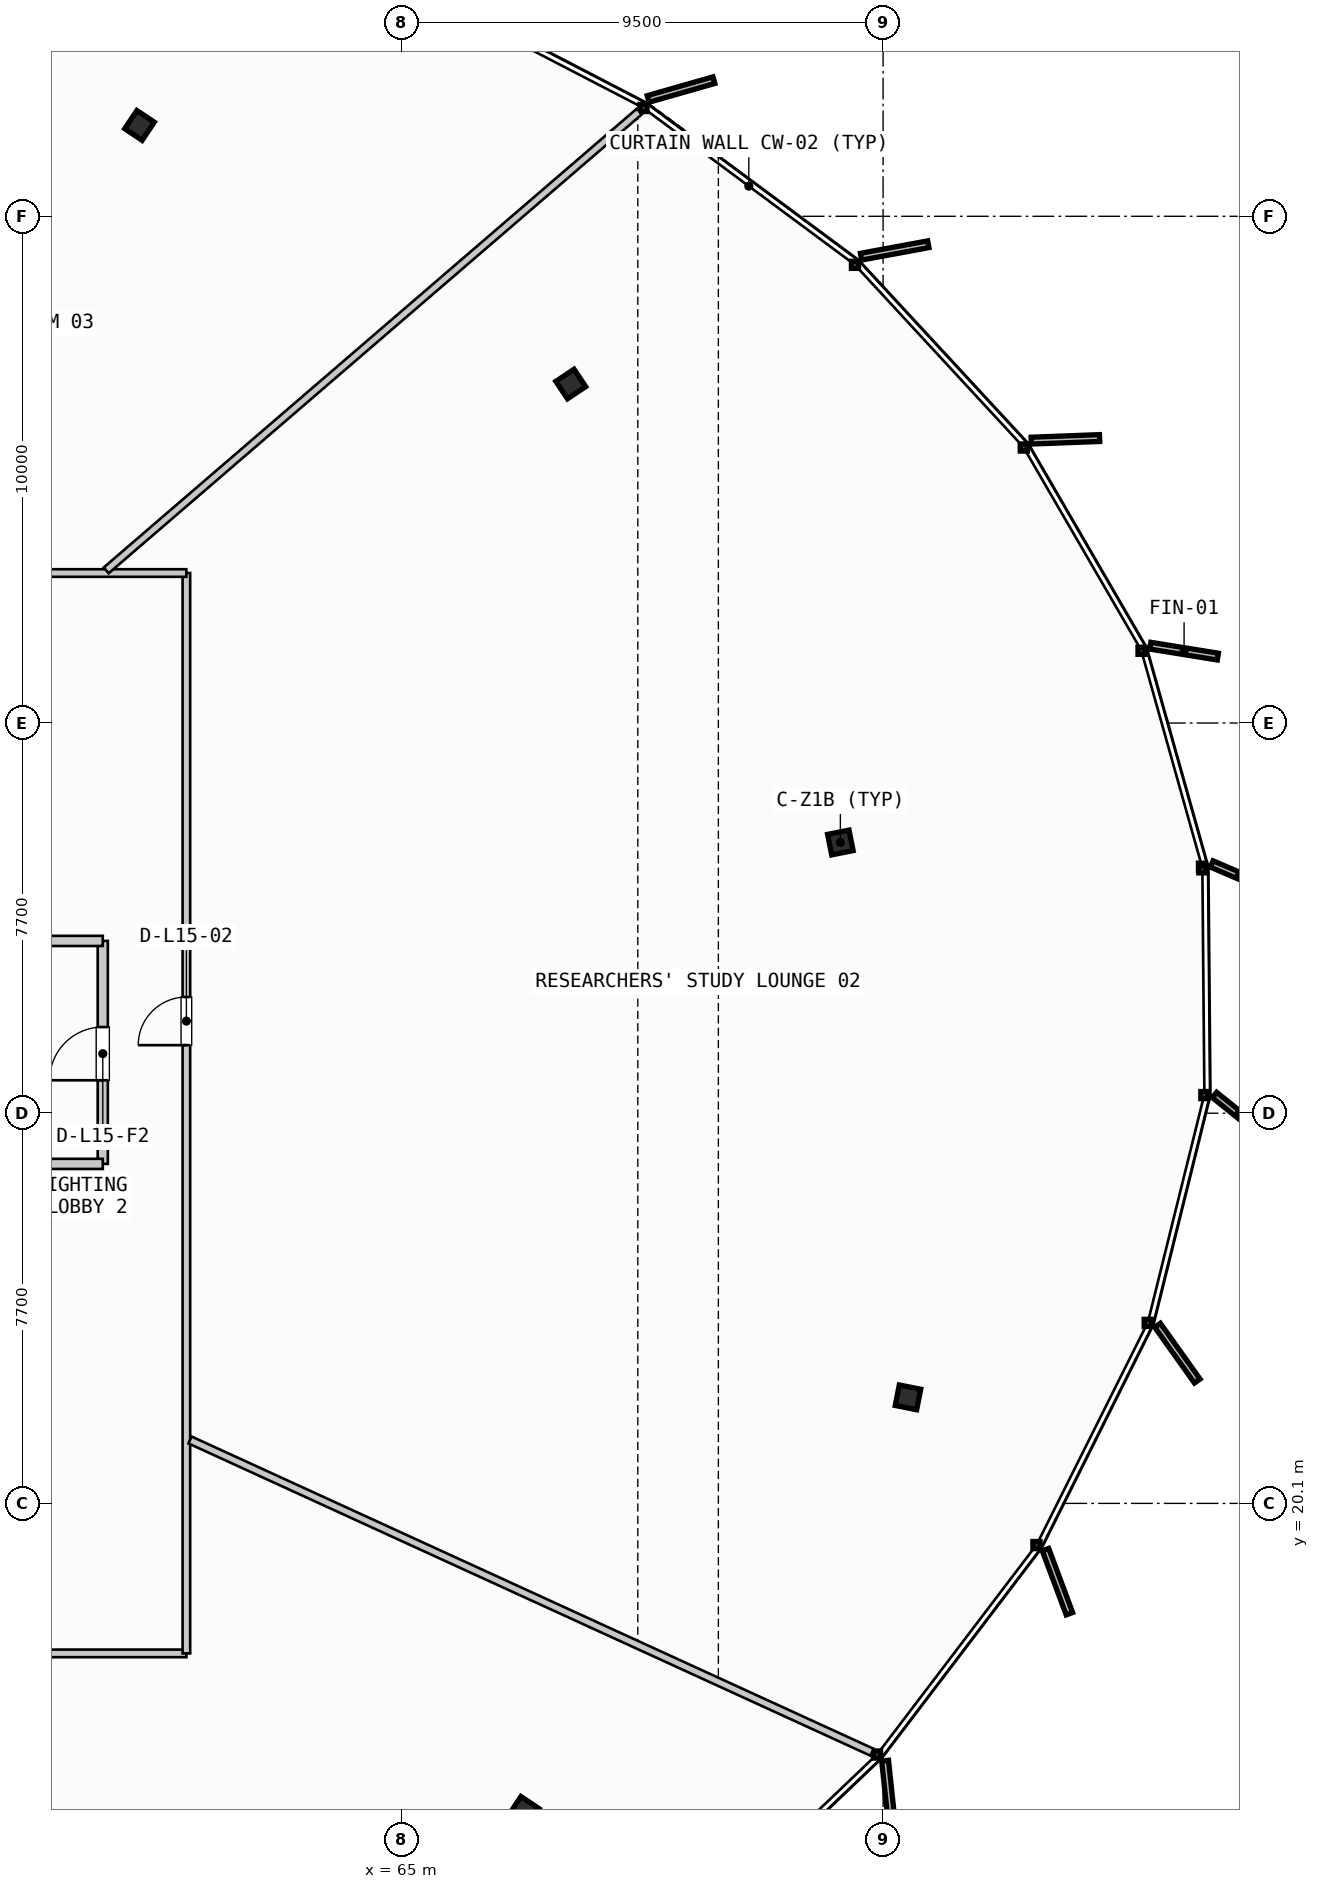
"""IFC4 building model, lengths in metres.
Left out: names, types, materials, properties, quantities, classifications, styles, units other than length and angle.
Written with IfcOpenShell. Run it as: python <this file> out.ifc"""

import sys

from ifc_helpers import new_model, si_unit, direction, frame, frame_2d, origin, origin_2d, place, context, subcontext, project, spatial, rectangle, i_section, extrude, source, transform, mapped, element, fill, save


model = new_model("IFC4")
c1 = context("Model", 3, precision=1e-05, world=origin(), true_north=direction((0.0, 1.0)))
c2 = subcontext(c1, "Body", "Model", "MODEL_VIEW")
j1 = project(units=[si_unit("LENGTHUNIT", "METRE"), si_unit("PLANEANGLEUNIT", "RADIAN")], contexts=[c1])
p1 = place(None, origin())
s1 = spatial("IfcSite", under=j1, at=p1, CompositionType="ELEMENT")
p2 = place(p1, origin())
s2 = spatial("IfcBuilding", under=s1, at=p2, CompositionType="ELEMENT")
p3 = place(p2, frame((0.0, 0.0, 63.8)))
s3 = spatial("IfcBuildingStorey", under=s2, at=p3, CompositionType="ELEMENT", Elevation=63.8)
m1 = source(origin(), c2, "Body", "SweptSolid", [
    extrude(i_section(OverallWidth=0.412, OverallDepth=0.431, WebThickness=0.042, FlangeThickness=0.068, FilletRadius=0.015, at=origin_2d()), origin(), (0.0, 0.0, 1.0), 3.55),
])
for number, where, z_axis, x_axis in (
    (1, (73.657, 33.142, 0.0), (0.0, 0.0, 1.0), (0.981, 0.195, 0.0)),
    (2, (68.336, 42.19, 0.0), (0.0, 0.0, 1.0), (0.831, 0.556, 0.0)),
    (3, (59.825, 47.293, 0.0), (0.0, 0.0, 1.0), (0.556, 0.831, 0.0)),
    (4, (67.418, 14.023, 0.0), (0.0, 0.0, 1.0), (0.831, -0.556, 0.0)),
    (5, (74.991, 22.192, 0.0), (0.0, 0.0, 1.0), (0.981, -0.195, 0.0)),
):
    element("IfcColumn", number, at=place(p3, frame(where, z_axis=z_axis, x_axis=x_axis)), inside=s3, PredefinedType="COLUMN", context=c2, shape_type="MappedRepresentation", body=[
        mapped(m1, transform((0.0, 0.0, 0.0), scale=1.0)),
    ])
p4 = place(p3, frame((59.1, 26.8, 0.0), z_axis=(0.0, 0.0, 1.0), x_axis=(0.0, 1.0, 0.0)))
e6 = element("IfcWall", 6, at=p4, inside=s3, PredefinedType="PARTITIONING", context=c2, shape_type="SweptSolid", body=[
    extrude(rectangle(XDim=4.4, YDim=0.2, at=frame_2d((2.2, 0.0))), origin(), (0.0, 0.0, 1.0), 2.505),
])
p5 = place(p4, frame((1.65, 0.0, 0.0)))
e7 = element("IfcOpeningElement", 7, at=p5, cuts=e6, PredefinedType="OPENING", context=c2, shape_type="SweptSolid", body=[
    extrude(rectangle(XDim=1.05, YDim=2.15, at=frame_2d((0.525, 1.075))), frame((0.0, 0.11, 0.0), z_axis=(0.0, -1.0, 0.0), x_axis=(1.0, 0.0, 0.0)), (0.0, 0.0, 1.0), 0.22),
])
for number, where, z_axis, x_axis in (
    (8, (55.96, 26.8, 0.0), (0.0, 0.0, 1.0), (1.0, 0.0, 0.0)),
    (9, (55.96, 31.2, 0.0), (0.0, 0.0, 1.0), (1.0, 0.0, 0.0)),
):
    element("IfcWall", number, at=place(p3, frame(where, z_axis=z_axis, x_axis=x_axis)), inside=s3, PredefinedType="PARTITIONING", context=c2, shape_type="SweptSolid", body=[
        extrude(rectangle(XDim=3.14, YDim=0.2, at=frame_2d((1.57, 0.0))), origin(), (0.0, 0.0, 1.0), 2.505),
    ])
p6 = place(p3, frame((31.29, 17.14, 0.0), z_axis=(0.0, 0.0, 1.0), x_axis=(1.0, 0.0, 0.0)))
e10 = element("IfcWall", 10, at=p6, inside=s3, PredefinedType="PARTITIONING", context=c2, shape_type="SweptSolid", body=[
    extrude(rectangle(XDim=29.46, YDim=0.15, at=frame_2d((14.73, 0.0))), origin(), (0.0, 0.0, 1.0), 2.505),
])
p7 = place(p6, frame((15.862, 0.0, 0.0)))
e11 = element("IfcOpeningElement", 11, at=p7, cuts=e10, PredefinedType="OPENING", context=c2, shape_type="SweptSolid", body=[
    extrude(rectangle(XDim=0.95, YDim=2.15, at=frame_2d((0.475, 1.075))), frame((0.0, 0.085, 0.0), z_axis=(0.0, -1.0, 0.0), x_axis=(1.0, 0.0, 0.0)), (0.0, 0.0, 1.0), 0.17),
])
p8 = place(p3, frame((60.75, 17.14, 0.0), z_axis=(0.0, 0.0, 1.0), x_axis=(0.0, 1.0, 0.0)))
e12 = element("IfcWall", 12, at=p8, inside=s3, PredefinedType="PARTITIONING", context=c2, shape_type="SweptSolid", body=[
    extrude(rectangle(XDim=21.32, YDim=0.15, at=frame_2d((10.66, 0.0))), origin(), (0.0, 0.0, 1.0), 2.505),
])
p9 = place(p8, frame((12.003, 0.0, 0.0)))
e13 = element("IfcOpeningElement", 13, at=p9, cuts=e12, PredefinedType="OPENING", context=c2, shape_type="SweptSolid", body=[
    extrude(rectangle(XDim=0.95, YDim=2.15, at=frame_2d((0.475, 1.075))), frame((0.0, 0.085, 0.0), z_axis=(0.0, -1.0, 0.0), x_axis=(1.0, 0.0, 0.0)), (0.0, 0.0, 1.0), 0.17),
])
p10 = place(p3, frame((60.75, 38.46, 0.0), z_axis=(0.0, 0.0, 1.0), x_axis=(-1.0, 0.0, 0.0)))
e14 = element("IfcWall", 14, at=p10, inside=s3, PredefinedType="PARTITIONING", context=c2, shape_type="SweptSolid", body=[
    extrude(rectangle(XDim=29.46, YDim=0.15, at=frame_2d((14.73, 0.0))), origin(), (0.0, 0.0, 1.0), 2.505),
])
p11 = place(p10, frame((6.863, 0.0, 0.0)))
e15 = element("IfcOpeningElement", 15, at=p11, cuts=e14, PredefinedType="OPENING", context=c2, shape_type="SweptSolid", body=[
    extrude(rectangle(XDim=0.95, YDim=2.15, at=frame_2d((0.475, 1.075))), frame((0.0, 0.085, 0.0), z_axis=(0.0, -1.0, 0.0), x_axis=(1.0, 0.0, 0.0)), (0.0, 0.0, 1.0), 0.17),
])
p12 = place(p10, frame((20.461, 0.0, 0.0)))
e16 = element("IfcOpeningElement", 16, at=p12, cuts=e14, PredefinedType="OPENING", context=c2, shape_type="SweptSolid", body=[
    extrude(rectangle(XDim=0.95, YDim=2.15, at=frame_2d((0.475, 1.075))), frame((0.0, 0.085, 0.0), z_axis=(0.0, -1.0, 0.0), x_axis=(1.0, 0.0, 0.0)), (0.0, 0.0, 1.0), 0.17),
])
p13 = place(p3, frame((60.823, 21.351, 0.0), z_axis=(0.0, 0.0, 1.0), x_axis=(0.909244099152, -0.416263339916, 0.0)))
e17 = element("IfcWall", 17, at=p13, inside=s3, PredefinedType="PARTITIONING", context=c2, shape_type="SweptSolid", body=[
    extrude(rectangle(XDim=14.801, YDim=0.15, at=frame_2d((7.4, 0.0))), origin(), (0.0, 0.0, 1.0), 2.505),
])
p14 = place(p3, frame((59.168, 38.512, 0.0), z_axis=(0.0, 0.0, 1.0), x_axis=(0.757930170229, 0.652335693533, 0.0)))
e18 = element("IfcWall", 18, at=p14, inside=s3, PredefinedType="PARTITIONING", context=c2, shape_type="SweptSolid", body=[
    extrude(rectangle(XDim=13.879, YDim=0.15, at=frame_2d((6.94, 0.0))), origin(), (0.0, 0.0, 1.0), 2.505),
])
m2 = source(origin(), c2, "Body", "SweptSolid", [
    extrude(rectangle(XDim=1.05, YDim=2.15, at=frame_2d((0.525, 1.075))), frame((0.0, 0.025, 0.0), z_axis=(0.0, -1.0, 0.0), x_axis=(1.0, 0.0, 0.0)), (0.0, 0.0, 1.0), 0.05),
])
p15 = place(p5, origin())
e19 = element("IfcDoor", 19, at=p15, inside=s3, OperationType="SINGLE_SWING_LEFT", PredefinedType="DOOR", context=c2, shape_type="MappedRepresentation", body=[
    mapped(m2, transform((0.0, 0.0, 0.0), scale=1.0)),
])
fill(e7, e19)
m3 = source(origin(), c2, "Body", "SweptSolid", [
    extrude(rectangle(XDim=0.95, YDim=2.15, at=frame_2d((0.475, 1.075))), frame((0.0, 0.025, 0.0), z_axis=(0.0, -1.0, 0.0), x_axis=(1.0, 0.0, 0.0)), (0.0, 0.0, 1.0), 0.05),
])
p16 = place(p9, origin())
e20 = element("IfcDoor", 20, at=p16, inside=s3, OperationType="SINGLE_SWING_LEFT", PredefinedType="DOOR", context=c2, shape_type="MappedRepresentation", body=[
    mapped(m3, transform((0.0, 0.0, 0.0), scale=1.0)),
])
fill(e13, e20)
save(model, sys.argv[1])
